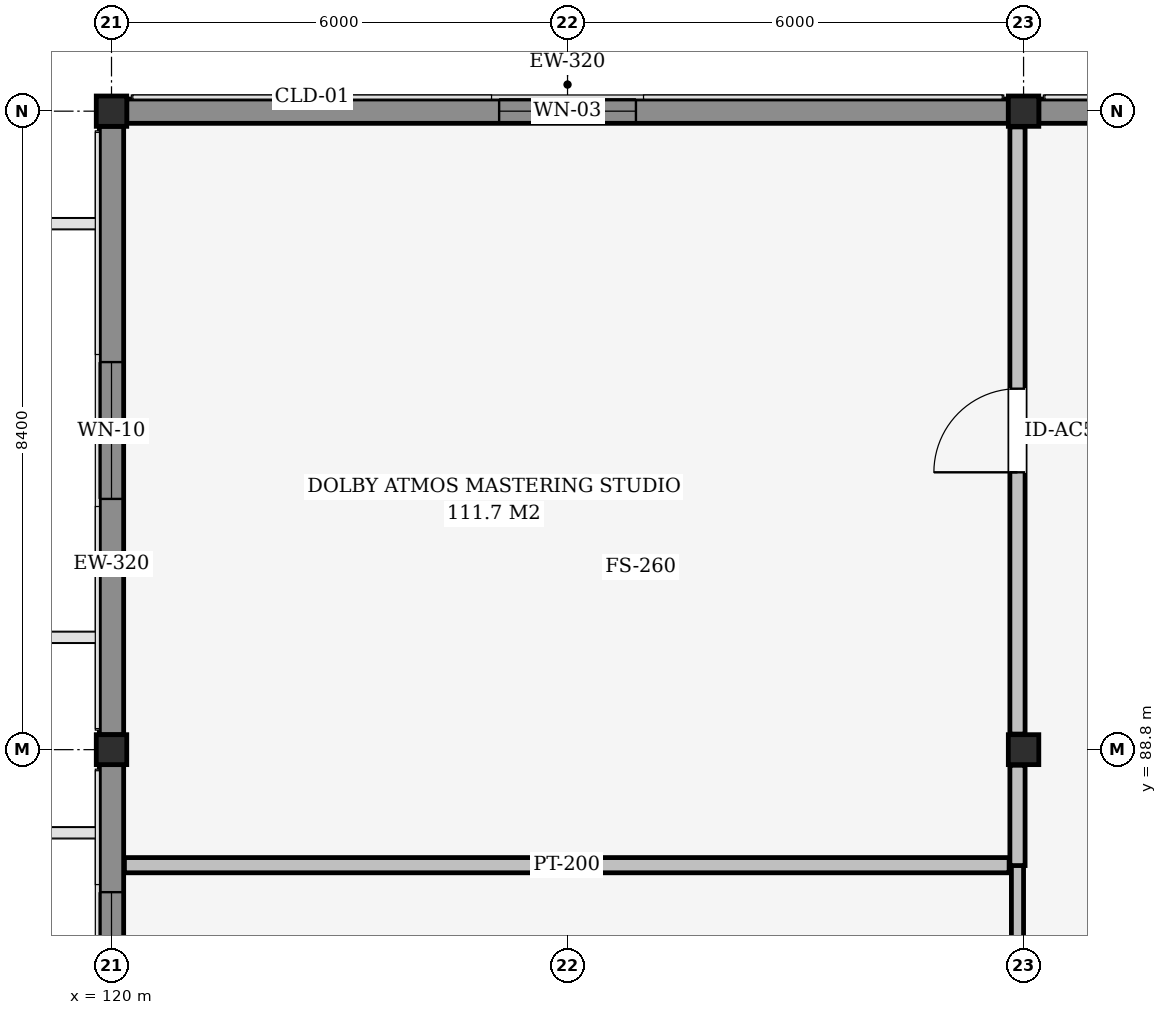
"""IFC4 building model, lengths in metres.
Left out: names, types, materials, properties, quantities, classifications, styles, units other than length and angle.
Written with IfcOpenShell. Run it as: python <this file> out.ifc"""

import sys

from ifc_helpers import new_model, si_unit, direction, frame, frame_2d, origin, origin_2d, place, context, subcontext, project, spatial, rectangle, i_section, extrude, element, fill, save


model = new_model("IFC4")
c1 = context("Model", 3, precision=1e-05, world=origin(), true_north=direction((0.0, 1.0)))
c2 = subcontext(c1, "Body", "Model", "MODEL_VIEW")
j1 = project(units=[si_unit("LENGTHUNIT", "METRE"), si_unit("PLANEANGLEUNIT", "RADIAN")], contexts=[c1])
p1 = place(None, origin())
s1 = spatial("IfcSite", under=j1, at=p1, CompositionType="ELEMENT")
p2 = place(p1, origin())
s2 = spatial("IfcBuilding", under=s1, at=p2, CompositionType="ELEMENT")
p3 = place(p2, frame((0.0, 0.0, 9.3)))
s3 = spatial("IfcBuildingStorey", under=s2, at=p3, CompositionType="ELEMENT", Elevation=9.3)
p4 = place(p3, frame((120.0, 88.8, 0.0), z_axis=(0.0, 0.0, 1.0), x_axis=(1.0, 0.0, 0.0)))
e1 = element("IfcColumn", 1, at=p4, inside=s3, PredefinedType="COLUMN", context=c2, shape_type="SweptSolid", body=[
    extrude(i_section(OverallWidth=0.401, OverallDepth=0.394, WebThickness=0.023, FlangeThickness=0.037, at=origin_2d()), origin(), (0.0, 0.0, 1.0), 4.5),
])
p5 = place(p3, frame((120.0, 97.2, 0.0), z_axis=(0.0, 0.0, 1.0), x_axis=(1.0, 0.0, 0.0)))
e2 = element("IfcColumn", 2, at=p5, inside=s3, PredefinedType="COLUMN", context=c2, shape_type="SweptSolid", body=[
    extrude(i_section(OverallWidth=0.401, OverallDepth=0.399, WebThickness=0.025, FlangeThickness=0.04, at=origin_2d()), origin(), (0.0, 0.0, 1.0), 4.5),
])
p6 = place(p3, frame((132.0, 88.8, 0.0), z_axis=(0.0, 0.0, 1.0), x_axis=(1.0, 0.0, 0.0)))
e3 = element("IfcColumn", 3, at=p6, inside=s3, PredefinedType="COLUMN", context=c2, shape_type="SweptSolid", body=[
    extrude(i_section(OverallWidth=0.401, OverallDepth=0.394, WebThickness=0.023, FlangeThickness=0.037, at=origin_2d()), origin(), (0.0, 0.0, 1.0), 4.5),
])
p7 = place(p3, frame((132.0, 97.2, 0.0), z_axis=(0.0, 0.0, 1.0), x_axis=(1.0, 0.0, 0.0)))
e4 = element("IfcColumn", 4, at=p7, inside=s3, PredefinedType="COLUMN", context=c2, shape_type="SweptSolid", body=[
    extrude(i_section(OverallWidth=0.401, OverallDepth=0.399, WebThickness=0.025, FlangeThickness=0.04, at=origin_2d()), origin(), (0.0, 0.0, 1.0), 4.5),
])
p8 = place(p3, frame((120.2, 97.2, 0.0), z_axis=(0.0, 0.0, 1.0), x_axis=(1.0, 0.0, 0.0)))
e5 = element("IfcWall", 5, at=p8, inside=s3, PredefinedType="SOLIDWALL", context=c2, shape_type="SweptSolid", body=[
    extrude(rectangle(XDim=11.599, YDim=0.32, at=frame_2d((5.8, 0.0))), origin(), (0.0, 0.0, 1.0), 3.388),
])
p9 = place(p8, frame((4.899, 0.0, 0.85)))
e6 = element("IfcOpeningElement", 6, at=p9, cuts=e5, PredefinedType="OPENING", context=c2, shape_type="SweptSolid", body=[
    extrude(rectangle(XDim=1.8, YDim=1.65, at=frame_2d((0.9, 0.825))), frame((0.0, 0.17, 0.0), z_axis=(0.0, -1.0, 0.0), x_axis=(1.0, 0.0, 0.0)), (0.0, 0.0, 1.0), 0.34),
])
p10 = place(p3, frame((132.2, 97.2, 0.0), z_axis=(0.0, 0.0, 1.0), x_axis=(1.0, 0.0, 0.0)))
e7 = element("IfcWall", 7, at=p10, inside=s3, PredefinedType="SOLIDWALL", context=c2, shape_type="SweptSolid", body=[
    extrude(rectangle(XDim=11.375, YDim=0.32, at=frame_2d((5.687, 0.0))), origin(), (0.0, 0.0, 1.0), 3.664),
])
p11 = place(p10, frame((2.435, 0.0, 0.85)))
e8 = element("IfcOpeningElement", 8, at=p11, cuts=e7, PredefinedType="OPENING", context=c2, shape_type="SweptSolid", body=[
    extrude(rectangle(XDim=1.5, YDim=1.65, at=frame_2d((0.75, 0.825))), frame((0.0, 0.17, 0.0), z_axis=(0.0, -1.0, 0.0), x_axis=(1.0, 0.0, 0.0)), (0.0, 0.0, 1.0), 0.34),
])
p12 = place(p3, frame((120.0, 82.997, 0.0), z_axis=(0.0, 0.0, 1.0), x_axis=(0.0, 1.0, 0.0)))
e9 = element("IfcWall", 9, at=p12, inside=s3, PredefinedType="SOLIDWALL", context=c2, shape_type="SweptSolid", body=[
    extrude(rectangle(XDim=5.606, YDim=0.32, at=frame_2d((2.803, 0.0))), origin(), (0.0, 0.0, 1.0), 3.764),
])
p13 = place(p12, frame((1.678, 0.0, 0.85)))
e10 = element("IfcOpeningElement", 10, at=p13, cuts=e9, PredefinedType="OPENING", context=c2, shape_type="SweptSolid", body=[
    extrude(rectangle(XDim=2.25, YDim=1.95, at=frame_2d((1.125, 0.975))), frame((0.0, 0.17, 0.0), z_axis=(0.0, -1.0, 0.0), x_axis=(1.0, 0.0, 0.0)), (0.0, 0.0, 1.0), 0.34),
])
p14 = place(p3, frame((120.0, 88.997, 0.0), z_axis=(0.0, 0.0, 1.0), x_axis=(0.0, 1.0, 0.0)))
e11 = element("IfcWall", 11, at=p14, inside=s3, PredefinedType="SOLIDWALL", context=c2, shape_type="SweptSolid", body=[
    extrude(rectangle(XDim=8.003, YDim=0.32, at=frame_2d((4.002, 0.0))), origin(), (0.0, 0.0, 1.0), 3.764),
])
p15 = place(p14, frame((3.102, 0.0, 0.85)))
e12 = element("IfcOpeningElement", 12, at=p15, cuts=e11, PredefinedType="OPENING", context=c2, shape_type="SweptSolid", body=[
    extrude(rectangle(XDim=1.8, YDim=0.95, at=frame_2d((0.9, 0.475))), frame((0.0, 0.17, 0.0), z_axis=(0.0, -1.0, 0.0), x_axis=(1.0, 0.0, 0.0)), (0.0, 0.0, 1.0), 0.34),
])
p16 = place(p3, frame((131.92, 83.005, 0.0), z_axis=(0.0, 0.0, 1.0), x_axis=(0.0, 1.0, 0.0)))
e13 = element("IfcWall", 13, at=p16, inside=s3, PredefinedType="PARTITIONING", context=c2, shape_type="SweptSolid", body=[
    extrude(rectangle(XDim=4.28, YDim=0.16, at=frame_2d((2.14, 0.0))), origin(), (0.0, 0.0, 1.0), 3.764),
])
p17 = place(p3, frame((131.92, 87.275, 0.0), z_axis=(0.0, 0.0, 1.0), x_axis=(0.0, 1.0, 0.0)))
e14 = element("IfcWall", 14, at=p17, inside=s3, PredefinedType="PARTITIONING", context=c2, shape_type="SweptSolid", body=[
    extrude(rectangle(XDim=1.32, YDim=0.2, at=frame_2d((0.66, 0.0))), origin(), (0.0, 0.0, 1.0), 3.764),
])
p18 = place(p3, frame((131.92, 89.005, 0.0), z_axis=(0.0, 0.0, 1.0), x_axis=(0.0, 1.0, 0.0)))
e15 = element("IfcWall", 15, at=p18, inside=s3, PredefinedType="PARTITIONING", context=c2, shape_type="SweptSolid", body=[
    extrude(rectangle(XDim=7.988, YDim=0.2, at=frame_2d((3.994, 0.0))), origin(), (0.0, 0.0, 1.0), 3.764),
])
p19 = place(p18, frame((3.444, 0.0, 0.0)))
e16 = element("IfcOpeningElement", 16, at=p19, cuts=e15, PredefinedType="OPENING", context=c2, shape_type="SweptSolid", body=[
    extrude(rectangle(XDim=1.1, YDim=2.26, at=frame_2d((0.55, 1.13))), frame((0.0, 0.11, 0.0), z_axis=(0.0, -1.0, 0.0), x_axis=(1.0, 0.0, 0.0)), (0.0, 0.0, 1.0), 0.22),
])
p20 = place(p3, frame((120.17, 87.28, 0.0), z_axis=(0.0, 0.0, 1.0), x_axis=(1.0, 0.0, 0.0)))
e17 = element("IfcWall", 17, at=p20, inside=s3, PredefinedType="PARTITIONING", context=c2, shape_type="SweptSolid", body=[
    extrude(rectangle(XDim=11.64, YDim=0.2, at=frame_2d((5.82, 0.0))), origin(), (0.0, 0.0, 1.0), 4.19),
])
p21 = place(p9, origin())
e18 = element("IfcWindow", 18, at=p21, inside=s3, PartitioningType="SINGLE_PANEL", PredefinedType="WINDOW", context=c2, shape_type="SweptSolid", body=[
    extrude(rectangle(XDim=1.8, YDim=1.65, at=frame_2d((0.9, 0.825))), frame((0.0, 0.03, 0.0), z_axis=(0.0, -1.0, 0.0), x_axis=(1.0, 0.0, 0.0)), (0.0, 0.0, 1.0), 0.06),
])
fill(e6, e18)
p22 = place(p13, origin())
e19 = element("IfcWindow", 19, at=p22, inside=s3, PartitioningType="SINGLE_PANEL", PredefinedType="WINDOW", context=c2, shape_type="SweptSolid", body=[
    extrude(rectangle(XDim=2.25, YDim=1.95, at=frame_2d((1.125, 0.975))), frame((0.0, 0.03, 0.0), z_axis=(0.0, -1.0, 0.0), x_axis=(1.0, 0.0, 0.0)), (0.0, 0.0, 1.0), 0.06),
])
fill(e10, e19)
p23 = place(p15, origin())
e20 = element("IfcWindow", 20, at=p23, inside=s3, PartitioningType="SINGLE_PANEL", PredefinedType="WINDOW", context=c2, shape_type="SweptSolid", body=[
    extrude(rectangle(XDim=1.8, YDim=0.95, at=frame_2d((0.9, 0.475))), frame((0.0, 0.03, 0.0), z_axis=(0.0, -1.0, 0.0), x_axis=(1.0, 0.0, 0.0)), (0.0, 0.0, 1.0), 0.06),
])
fill(e12, e20)
p24 = place(p19, origin())
e21 = element("IfcDoor", 21, at=p24, inside=s3, OperationType="SINGLE_SWING_LEFT", PredefinedType="DOOR", context=c2, shape_type="SweptSolid", body=[
    extrude(rectangle(XDim=1.1, YDim=2.26, at=frame_2d((0.55, 1.13))), frame((0.0, 0.025, 0.0), z_axis=(0.0, -1.0, 0.0), x_axis=(1.0, 0.0, 0.0)), (0.0, 0.0, 1.0), 0.05),
])
fill(e16, e21)
save(model, sys.argv[1])
